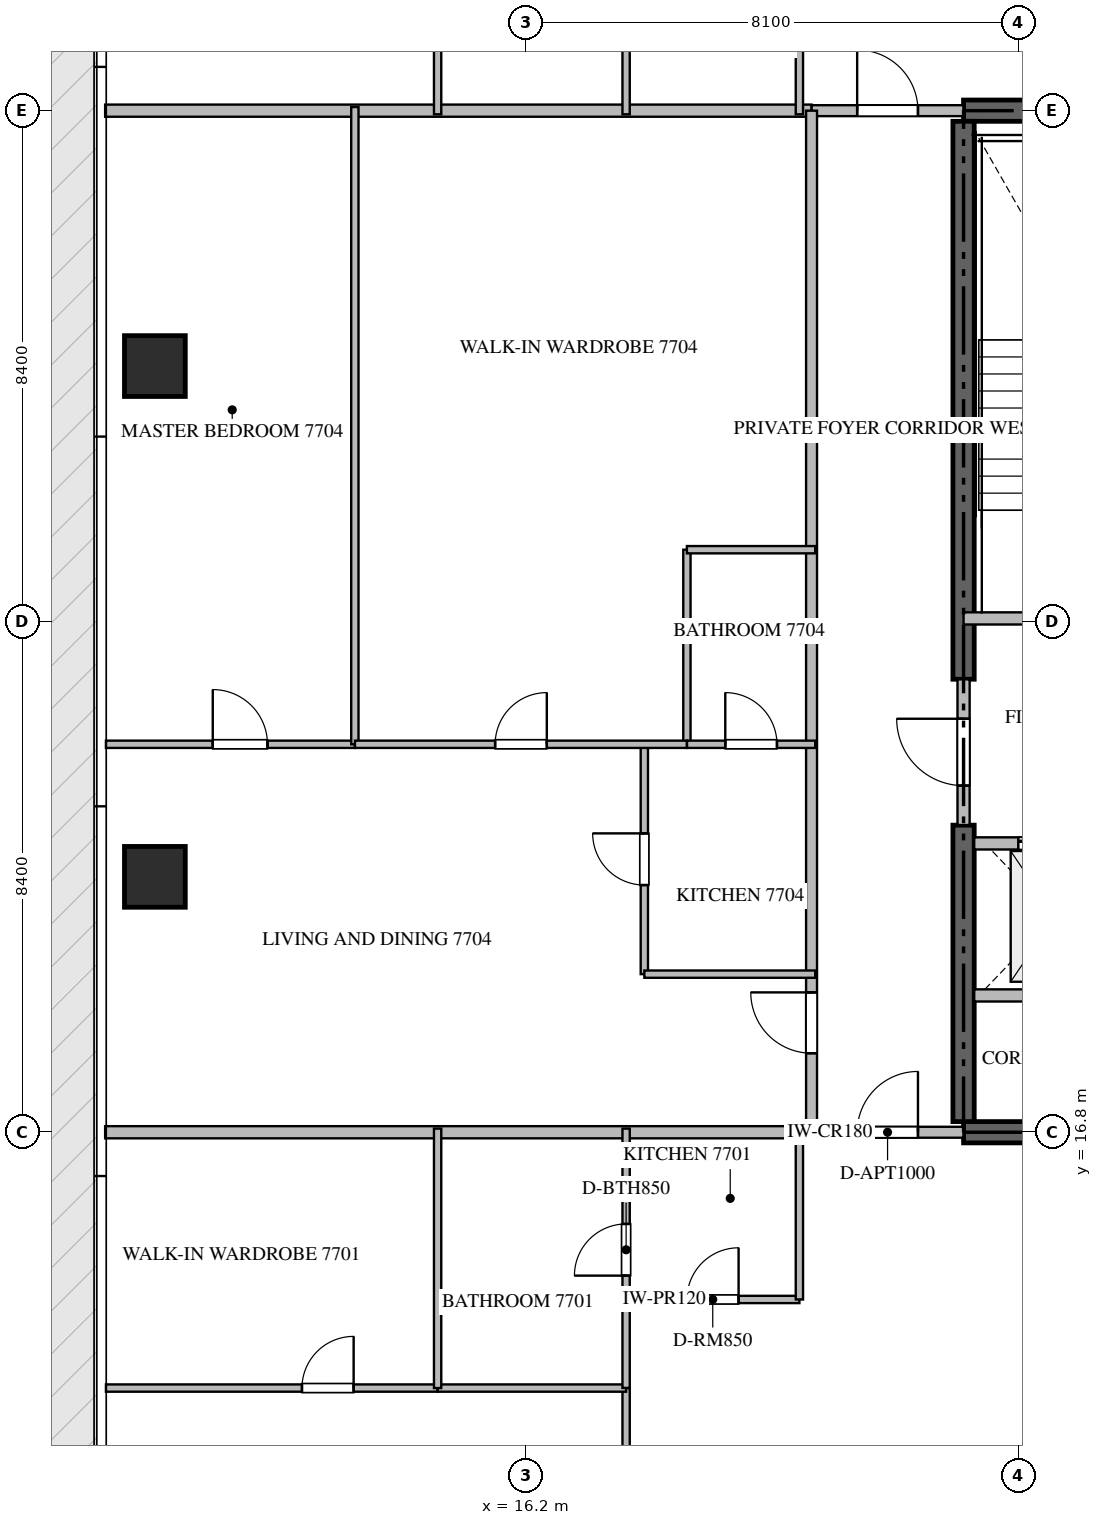
"""IFC4 building model, lengths in metres.
Left out: names, types, materials, properties, quantities, classifications, styles, units other than length and angle.
Written with IfcOpenShell. Run it as: python <this file> out.ifc"""

import sys

from ifc_helpers import new_model, si_unit, direction, frame, frame_2d, origin, origin_2d, place, context, subcontext, project, spatial, rectangle, extrude, source, transform, mapped, element, fill, save


model = new_model("IFC4")
c1 = context("Model", 3, precision=1e-05, world=origin(), true_north=direction((0.0, 1.0)))
c2 = subcontext(c1, "Body", "Model", "MODEL_VIEW")
j1 = project(units=[si_unit("LENGTHUNIT", "METRE"), si_unit("PLANEANGLEUNIT", "RADIAN")], contexts=[c1])
p1 = place(None, origin())
s1 = spatial("IfcSite", under=j1, at=p1, CompositionType="ELEMENT")
p2 = place(p1, origin())
s2 = spatial("IfcBuilding", under=s1, at=p2, CompositionType="ELEMENT")
p3 = place(p2, frame((0.0, 0.0, 309.65)))
s3 = spatial("IfcBuildingStorey", under=s2, at=p3, CompositionType="ELEMENT", Elevation=309.65)
for number, where, z_axis, x_axis in (
    (1, (23.4, 16.8, -0.26), (0.0, 0.0, 1.0), (1.0, 0.0, 0.0)),
    (2, (41.4, 33.6, -0.26), (0.0, 0.0, 1.0), (-1.0, 0.0, 0.0)),
):
    element("IfcWall", number, at=place(p3, frame(where, z_axis=z_axis, x_axis=x_axis)), inside=s3, PredefinedType="SHEAR", context=c2, shape_type="SweptSolid", body=[
        extrude(rectangle(XDim=18.0, YDim=0.35, at=frame_2d((9.0, 0.0))), origin(), (0.0, 0.0, 1.0), 4.048),
    ])
p4 = place(p3, frame((23.4, 16.975, -0.26), z_axis=(0.0, 0.0, 1.0), x_axis=(0.0, 1.0, 0.0)))
e3 = element("IfcWall", 3, at=p4, inside=s3, PredefinedType="SHEAR", context=c2, shape_type="SweptSolid", body=[
    extrude(rectangle(XDim=4.875, YDim=0.35, at=frame_2d((2.438, 0.0))), origin(), (0.0, 0.0, 1.0), 4.048),
])
p5 = place(p3, frame((23.4, 24.25, -0.26), z_axis=(0.0, 0.0, 1.0), x_axis=(0.0, 1.0, 0.0)))
e4 = element("IfcWall", 4, at=p5, inside=s3, PredefinedType="SHEAR", context=c2, shape_type="SweptSolid", body=[
    extrude(rectangle(XDim=9.175, YDim=0.35, at=frame_2d((4.587, 0.0))), origin(), (0.0, 0.0, 1.0), 4.048),
])
m1 = source(origin(), c2, "Body", "SweptSolid", [
    extrude(rectangle(XDim=1.0, YDim=1.0, at=origin_2d()), origin(), (0.0, 0.0, 1.0), 4.05),
])
for number, where, z_axis, x_axis in (
    (5, (10.1, 21.0, -0.26), (0.0, 0.0, 1.0), (1.0, 0.0, 0.0)),
    (6, (10.1, 29.4, -0.26), (0.0, 0.0, 1.0), (1.0, 0.0, 0.0)),
):
    element("IfcColumn", number, at=place(p3, frame(where, z_axis=z_axis, x_axis=x_axis)), inside=s3, PredefinedType="COLUMN", context=c2, shape_type="MappedRepresentation", body=[
        mapped(m1, transform((0.0, 0.0, 0.0), scale=1.0)),
    ])
p6 = place(p3, frame((23.4, 25.25, 0.0), z_axis=(0.0, 0.0, 1.0), x_axis=(1.0, 0.0, 0.0)))
e7 = element("IfcWall", 7, at=p6, inside=s3, PredefinedType="STANDARD", context=c2, shape_type="SweptSolid", body=[
    extrude(rectangle(XDim=4.45, YDim=0.2, at=frame_2d((2.225, 0.0))), origin(), (0.0, 0.0, 1.0), 3.79),
])
p7 = place(p6, frame((1.65, 0.0, 0.0)))
e8 = element("IfcOpeningElement", 8, at=p7, cuts=e7, PredefinedType="OPENING", context=c2, shape_type="SweptSolid", body=[
    extrude(rectangle(XDim=1.1, YDim=2.15, at=frame_2d((0.55, 1.075))), frame((0.0, 0.11, 0.0), z_axis=(0.0, -1.0, 0.0), x_axis=(1.0, 0.0, 0.0)), (0.0, 0.0, 1.0), 0.22),
])
p8 = place(p3, frame((23.575, 21.55, 0.0), z_axis=(0.0, 0.0, 1.0), x_axis=(1.0, 0.0, 0.0)))
e9 = element("IfcWall", 9, at=p8, inside=s3, PredefinedType="STANDARD", context=c2, shape_type="SweptSolid", body=[
    extrude(rectangle(XDim=2.475, YDim=0.2, at=frame_2d((1.238, 0.0))), origin(), (0.0, 0.0, 1.0), 3.79),
])
p9 = place(p8, frame((0.725, 0.0, 0.0)))
e10 = element("IfcOpeningElement", 10, at=p9, cuts=e9, PredefinedType="OPENING", context=c2, shape_type="SweptSolid", body=[
    extrude(rectangle(XDim=1.2, YDim=2.2, at=frame_2d((0.6, 1.1))), frame((0.0, 0.11, 0.0), z_axis=(0.0, -1.0, 0.0), x_axis=(1.0, 0.0, 0.0)), (0.0, 0.0, 1.0), 0.22),
])
p10 = place(p3, frame((23.575, 19.05, 0.0), z_axis=(0.0, 0.0, 1.0), x_axis=(1.0, 0.0, 0.0)))
e11 = element("IfcWall", 11, at=p10, inside=s3, PredefinedType="STANDARD", context=c2, shape_type="SweptSolid", body=[
    extrude(rectangle(XDim=2.475, YDim=0.2, at=frame_2d((1.238, 0.0))), origin(), (0.0, 0.0, 1.0), 3.79),
])
p11 = place(p3, frame((23.4, 21.852, 0.0), z_axis=(0.0, 0.0, 1.0), x_axis=(0.0, 1.0, 0.0)))
e12 = element("IfcWall", 12, at=p11, inside=s3, PredefinedType="STANDARD", context=c2, shape_type="SweptSolid", body=[
    extrude(rectangle(XDim=2.396, YDim=0.2, at=frame_2d((1.198, 0.0))), origin(), (0.0, 0.0, 1.0), 3.79),
])
p12 = place(p11, frame((0.648, 0.0, 0.0)))
e13 = element("IfcOpeningElement", 13, at=p12, cuts=e12, PredefinedType="OPENING", context=c2, shape_type="SweptSolid", body=[
    extrude(rectangle(XDim=1.1, YDim=2.15, at=frame_2d((0.55, 1.075))), frame((0.0, 0.11, 0.0), z_axis=(0.0, -1.0, 0.0), x_axis=(1.0, 0.0, 0.0)), (0.0, 0.0, 1.0), 0.22),
])
for number, where, z_axis, x_axis in (
    (14, (9.282, 16.8, 0.0), (0.0, 0.0, 1.0), (1.0, 0.0, 0.0)),
    (15, (9.282, 33.6, 0.0), (0.0, 0.0, 1.0), (1.0, 0.0, 0.0)),
):
    element("IfcWall", number, at=place(p3, frame(where, z_axis=z_axis, x_axis=x_axis)), inside=s3, PredefinedType="PARTITIONING", context=c2, shape_type="SweptSolid", body=[
        extrude(rectangle(XDim=11.618, YDim=0.2, at=frame_2d((5.809, 0.0))), origin(), (0.0, 0.0, 1.0), 3.79),
    ])
p13 = place(p3, frame((20.902, 16.8, 0.0), z_axis=(0.0, 0.0, 1.0), x_axis=(1.0, 0.0, 0.0)))
e16 = element("IfcWall", 16, at=p13, inside=s3, PredefinedType="PARTITIONING", context=c2, shape_type="SweptSolid", body=[
    extrude(rectangle(XDim=2.496, YDim=0.18, at=frame_2d((1.248, 0.0))), origin(), (0.0, 0.0, 1.0), 3.79),
])
p14 = place(p13, frame((0.748, 0.0, 0.0)))
e17 = element("IfcOpeningElement", 17, at=p14, cuts=e16, PredefinedType="OPENING", context=c2, shape_type="SweptSolid", body=[
    extrude(rectangle(XDim=1.0, YDim=2.15, at=frame_2d((0.5, 1.075))), frame((0.0, 0.1, 0.0), z_axis=(0.0, -1.0, 0.0), x_axis=(1.0, 0.0, 0.0)), (0.0, 0.0, 1.0), 0.2),
])
p15 = place(p3, frame((20.902, 33.6, 0.0), z_axis=(0.0, 0.0, 1.0), x_axis=(1.0, 0.0, 0.0)))
e18 = element("IfcWall", 18, at=p15, inside=s3, PredefinedType="PARTITIONING", context=c2, shape_type="SweptSolid", body=[
    extrude(rectangle(XDim=2.496, YDim=0.18, at=frame_2d((1.248, 0.0))), origin(), (0.0, 0.0, 1.0), 3.79),
])
p16 = place(p15, frame((0.748, 0.0, 0.0)))
e19 = element("IfcOpeningElement", 19, at=p16, cuts=e18, PredefinedType="OPENING", context=c2, shape_type="SweptSolid", body=[
    extrude(rectangle(XDim=1.0, YDim=2.15, at=frame_2d((0.5, 1.075))), frame((0.0, 0.1, 0.0), z_axis=(0.0, -1.0, 0.0), x_axis=(1.0, 0.0, 0.0)), (0.0, 0.0, 1.0), 0.2),
])
p17 = place(p3, frame((20.9, 16.8, 0.0), z_axis=(0.0, 0.0, 1.0), x_axis=(0.0, 1.0, 0.0)))
e20 = element("IfcWall", 20, at=p17, inside=s3, PredefinedType="PARTITIONING", context=c2, shape_type="SweptSolid", body=[
    extrude(rectangle(XDim=16.8, YDim=0.18, at=frame_2d((8.4, 0.0))), origin(), (0.0, 0.0, 1.0), 3.79),
])
p18 = place(p17, frame((1.3, 0.0, 0.0)))
e21 = element("IfcOpeningElement", 21, at=p18, cuts=e20, PredefinedType="OPENING", context=c2, shape_type="SweptSolid", body=[
    extrude(rectangle(XDim=1.0, YDim=2.15, at=frame_2d((0.5, 1.075))), frame((0.0, 0.1, 0.0), z_axis=(0.0, -1.0, 0.0), x_axis=(1.0, 0.0, 0.0)), (0.0, 0.0, 1.0), 0.2),
])
p19 = place(p3, frame((17.85, 14.05, 0.0), z_axis=(0.0, 0.0, 1.0), x_axis=(1.0, 0.0, 0.0)))
e22 = element("IfcWall", 22, at=p19, inside=s3, PredefinedType="PARTITIONING", context=c2, shape_type="SweptSolid", body=[
    extrude(rectangle(XDim=2.85, YDim=0.12, at=frame_2d((1.425, 0.0))), origin(), (0.0, 0.0, 1.0), 3.492),
])
p20 = place(p19, frame((1.0, 0.0, 0.0)))
e23 = element("IfcOpeningElement", 23, at=p20, cuts=e22, PredefinedType="OPENING", context=c2, shape_type="SweptSolid", body=[
    extrude(rectangle(XDim=0.85, YDim=2.1, at=frame_2d((0.425, 1.05))), frame((0.0, 0.07, 0.0), z_axis=(0.0, -1.0, 0.0), x_axis=(1.0, 0.0, 0.0)), (0.0, 0.0, 1.0), 0.14),
])
p21 = place(p3, frame((20.7, 14.05, 0.0), z_axis=(0.0, 0.0, 1.0), x_axis=(0.0, 1.0, 0.0)))
e24 = element("IfcWall", 24, at=p21, inside=s3, PredefinedType="PARTITIONING", context=c2, shape_type="SweptSolid", body=[
    extrude(rectangle(XDim=2.81, YDim=0.12, at=frame_2d((1.405, 0.0))), origin(), (0.0, 0.0, 1.0), 3.79),
])
p22 = place(p3, frame((17.85, 2.495, 0.0), z_axis=(0.0, 0.0, 1.0), x_axis=(0.0, 1.0, 0.0)))
e25 = element("IfcWall", 25, at=p22, inside=s3, PredefinedType="PARTITIONING", context=c2, shape_type="SweptSolid", body=[
    extrude(rectangle(XDim=10.098, YDim=0.12, at=frame_2d((5.049, 0.0))), origin(), (0.0, 0.0, 1.0), 3.292),
])
p23 = place(p22, frame((5.059, 0.0, 0.0)))
e26 = element("IfcOpeningElement", 26, at=p23, cuts=e25, PredefinedType="OPENING", context=c2, shape_type="SweptSolid", body=[
    extrude(rectangle(XDim=0.9, YDim=2.1, at=frame_2d((0.45, 1.05))), frame((0.0, 0.07, 0.0), z_axis=(0.0, -1.0, 0.0), x_axis=(1.0, 0.0, 0.0)), (0.0, 0.0, 1.0), 0.14),
])
p24 = place(p3, frame((9.295, 12.593, 0.0), z_axis=(0.0, 0.0, 1.0), x_axis=(1.0, 0.0, 0.0)))
e27 = element("IfcWall", 27, at=p24, inside=s3, PredefinedType="PARTITIONING", context=c2, shape_type="SweptSolid", body=[
    extrude(rectangle(XDim=5.455, YDim=0.12, at=frame_2d((2.728, 0.0))), origin(), (0.0, 0.0, 1.0), 3.79),
])
p25 = place(p24, frame((3.224, 0.0, 0.0)))
e28 = element("IfcOpeningElement", 28, at=p25, cuts=e27, PredefinedType="OPENING", context=c2, shape_type="SweptSolid", body=[
    extrude(rectangle(XDim=0.85, YDim=2.1, at=frame_2d((0.425, 1.05))), frame((0.0, 0.07, 0.0), z_axis=(0.0, -1.0, 0.0), x_axis=(1.0, 0.0, 0.0)), (0.0, 0.0, 1.0), 0.14),
])
p26 = place(p3, frame((14.752, 12.593, 0.0), z_axis=(0.0, 0.0, 1.0), x_axis=(1.0, 0.0, 0.0)))
e29 = element("IfcWall", 29, at=p26, inside=s3, PredefinedType="PARTITIONING", context=c2, shape_type="SweptSolid", body=[
    extrude(rectangle(XDim=3.098, YDim=0.12, at=frame_2d((1.549, 0.0))), origin(), (0.0, 0.0, 1.0), 3.79),
])
p27 = place(p3, frame((14.75, 12.593, 0.0), z_axis=(0.0, 0.0, 1.0), x_axis=(0.0, 1.0, 0.0)))
e30 = element("IfcWall", 30, at=p27, inside=s3, PredefinedType="PARTITIONING", context=c2, shape_type="SweptSolid", body=[
    extrude(rectangle(XDim=4.267, YDim=0.12, at=frame_2d((2.134, 0.0))), origin(), (0.0, 0.0, 1.0), 3.79),
])
p28 = place(p3, frame((17.85, 12.595, 0.0), z_axis=(0.0, 0.0, 1.0), x_axis=(0.0, 1.0, 0.0)))
e31 = element("IfcWall", 31, at=p28, inside=s3, PredefinedType="PARTITIONING", context=c2, shape_type="SweptSolid", body=[
    extrude(rectangle(XDim=4.265, YDim=0.12, at=frame_2d((2.133, 0.0))), origin(), (0.0, 0.0, 1.0), 3.372),
])
p29 = place(p28, frame((1.847, 0.0, 0.0)))
e32 = element("IfcOpeningElement", 32, at=p29, cuts=e31, PredefinedType="OPENING", context=c2, shape_type="SweptSolid", body=[
    extrude(rectangle(XDim=0.85, YDim=2.1, at=frame_2d((0.425, 1.05))), frame((0.0, 0.07, 0.0), z_axis=(0.0, -1.0, 0.0), x_axis=(1.0, 0.0, 0.0)), (0.0, 0.0, 1.0), 0.14),
])
p30 = place(p3, frame((20.7, 36.35, 0.0), z_axis=(0.0, 0.0, 1.0), x_axis=(0.0, -1.0, 0.0)))
e33 = element("IfcWall", 33, at=p30, inside=s3, PredefinedType="PARTITIONING", context=c2, shape_type="SweptSolid", body=[
    extrude(rectangle(XDim=2.81, YDim=0.12, at=frame_2d((1.405, 0.0))), origin(), (0.0, 0.0, 1.0), 3.79),
])
p31 = place(p3, frame((14.75, 37.807, 0.0), z_axis=(0.0, 0.0, 1.0), x_axis=(0.0, -1.0, 0.0)))
e34 = element("IfcWall", 34, at=p31, inside=s3, PredefinedType="PARTITIONING", context=c2, shape_type="SweptSolid", body=[
    extrude(rectangle(XDim=4.267, YDim=0.12, at=frame_2d((2.133, 0.0))), origin(), (0.0, 0.0, 1.0), 3.79),
])
p32 = place(p3, frame((17.85, 37.805, 0.0), z_axis=(0.0, 0.0, 1.0), x_axis=(0.0, -1.0, 0.0)))
e35 = element("IfcWall", 35, at=p32, inside=s3, PredefinedType="PARTITIONING", context=c2, shape_type="SweptSolid", body=[
    extrude(rectangle(XDim=4.265, YDim=0.12, at=frame_2d((2.132, 0.0))), origin(), (0.0, 0.0, 1.0), 3.372),
])
p33 = place(p32, frame((1.848, 0.0, 0.0)))
e36 = element("IfcOpeningElement", 36, at=p33, cuts=e35, PredefinedType="OPENING", context=c2, shape_type="SweptSolid", body=[
    extrude(rectangle(XDim=0.85, YDim=2.1, at=frame_2d((0.425, 1.05))), frame((0.0, 0.07, 0.0), z_axis=(0.0, -1.0, 0.0), x_axis=(1.0, 0.0, 0.0)), (0.0, 0.0, 1.0), 0.14),
])
p34 = place(p3, frame((18.15, 19.4, 0.0), z_axis=(0.0, 0.0, 1.0), x_axis=(0.0, 1.0, 0.0)))
e37 = element("IfcWall", 37, at=p34, inside=s3, PredefinedType="PARTITIONING", context=c2, shape_type="SweptSolid", body=[
    extrude(rectangle(XDim=3.78, YDim=0.12, at=frame_2d((1.89, 0.0))), origin(), (0.0, 0.0, 1.0), 3.79),
])
p35 = place(p34, frame((1.465, 0.0, 0.0)))
e38 = element("IfcOpeningElement", 38, at=p35, cuts=e37, PredefinedType="OPENING", context=c2, shape_type="SweptSolid", body=[
    extrude(rectangle(XDim=0.85, YDim=2.1, at=frame_2d((0.425, 1.05))), frame((0.0, 0.07, 0.0), z_axis=(0.0, -1.0, 0.0), x_axis=(1.0, 0.0, 0.0)), (0.0, 0.0, 1.0), 0.14),
])
p36 = place(p3, frame((18.15, 19.4, 0.0), z_axis=(0.0, 0.0, 1.0), x_axis=(1.0, 0.0, 0.0)))
e39 = element("IfcWall", 39, at=p36, inside=s3, PredefinedType="PARTITIONING", context=c2, shape_type="SweptSolid", body=[
    extrude(rectangle(XDim=2.81, YDim=0.12, at=frame_2d((1.405, 0.0))), origin(), (0.0, 0.0, 1.0), 3.79),
])
p37 = place(p3, frame((9.295, 23.18, 0.0), z_axis=(0.0, 0.0, 1.0), x_axis=(1.0, 0.0, 0.0)))
e40 = element("IfcWall", 40, at=p37, inside=s3, PredefinedType="PARTITIONING", context=c2, shape_type="SweptSolid", body=[
    extrude(rectangle(XDim=4.094, YDim=0.12, at=frame_2d((2.047, 0.0))), origin(), (0.0, 0.0, 1.0), 3.79),
])
p38 = place(p37, frame((1.757, 0.0, 0.0)))
e41 = element("IfcOpeningElement", 41, at=p38, cuts=e40, PredefinedType="OPENING", context=c2, shape_type="SweptSolid", body=[
    extrude(rectangle(XDim=0.9, YDim=2.1, at=frame_2d((0.45, 1.05))), frame((0.0, 0.07, 0.0), z_axis=(0.0, -1.0, 0.0), x_axis=(1.0, 0.0, 0.0)), (0.0, 0.0, 1.0), 0.14),
])
p39 = place(p3, frame((13.389, 23.18, 0.0), z_axis=(0.0, 0.0, 1.0), x_axis=(0.0, 1.0, 0.0)))
e42 = element("IfcWall", 42, at=p39, inside=s3, PredefinedType="PARTITIONING", context=c2, shape_type="SweptSolid", body=[
    extrude(rectangle(XDim=10.48, YDim=0.12, at=frame_2d((5.24, 0.0))), origin(), (0.0, 0.0, 1.0), 3.79),
])
p40 = place(p3, frame((18.85, 23.18, 0.0), z_axis=(0.0, 0.0, 1.0), x_axis=(0.0, 1.0, 0.0)))
e43 = element("IfcWall", 43, at=p40, inside=s3, PredefinedType="PARTITIONING", context=c2, shape_type="SweptSolid", body=[
    extrude(rectangle(XDim=3.2, YDim=0.12, at=frame_2d((1.6, 0.0))), origin(), (0.0, 0.0, 1.0), 3.79),
])
p41 = place(p3, frame((18.85, 26.38, 0.0), z_axis=(0.0, 0.0, 1.0), x_axis=(1.0, 0.0, 0.0)))
e44 = element("IfcWall", 44, at=p41, inside=s3, PredefinedType="PARTITIONING", context=c2, shape_type="SweptSolid", body=[
    extrude(rectangle(XDim=2.11, YDim=0.12, at=frame_2d((1.055, 0.0))), origin(), (0.0, 0.0, 1.0), 3.79),
])
p42 = place(p3, frame((13.391, 23.18, 0.0), z_axis=(0.0, 0.0, 1.0), x_axis=(1.0, 0.0, 0.0)))
e45 = element("IfcWall", 45, at=p42, inside=s3, PredefinedType="PARTITIONING", context=c2, shape_type="SweptSolid", body=[
    extrude(rectangle(XDim=5.459, YDim=0.12, at=frame_2d((2.729, 0.0))), origin(), (0.0, 0.0, 1.0), 3.79),
])
p43 = place(p42, frame((2.305, 0.0, 0.0)))
e46 = element("IfcOpeningElement", 46, at=p43, cuts=e45, PredefinedType="OPENING", context=c2, shape_type="SweptSolid", body=[
    extrude(rectangle(XDim=0.85, YDim=2.1, at=frame_2d((0.425, 1.05))), frame((0.0, 0.07, 0.0), z_axis=(0.0, -1.0, 0.0), x_axis=(1.0, 0.0, 0.0)), (0.0, 0.0, 1.0), 0.14),
])
p44 = place(p3, frame((18.852, 23.18, 0.0), z_axis=(0.0, 0.0, 1.0), x_axis=(1.0, 0.0, 0.0)))
e47 = element("IfcWall", 47, at=p44, inside=s3, PredefinedType="PARTITIONING", context=c2, shape_type="SweptSolid", body=[
    extrude(rectangle(XDim=2.108, YDim=0.12, at=frame_2d((1.054, 0.0))), origin(), (0.0, 0.0, 1.0), 3.79),
])
p45 = place(p44, frame((0.629, 0.0, 0.0)))
e48 = element("IfcOpeningElement", 48, at=p45, cuts=e47, PredefinedType="OPENING", context=c2, shape_type="SweptSolid", body=[
    extrude(rectangle(XDim=0.85, YDim=2.1, at=frame_2d((0.425, 1.05))), frame((0.0, 0.07, 0.0), z_axis=(0.0, -1.0, 0.0), x_axis=(1.0, 0.0, 0.0)), (0.0, 0.0, 1.0), 0.14),
])
m2 = source(origin(), c2, "Body", "SweptSolid", [
    extrude(rectangle(XDim=1.2, YDim=2.2, at=frame_2d((0.6, 1.1))), frame((0.0, 0.025, 0.0), z_axis=(0.0, -1.0, 0.0), x_axis=(1.0, 0.0, 0.0)), (0.0, 0.0, 1.0), 0.05),
])
p46 = place(p9, origin())
e49 = element("IfcDoor", 49, at=p46, inside=s3, OperationType="DOUBLE_DOOR_SLIDING", PredefinedType="DOOR", context=c2, shape_type="MappedRepresentation", body=[
    mapped(m2, transform((0.0, 0.0, 0.0), scale=1.0)),
])
fill(e10, e49)
m3 = source(origin(), c2, "Body", "SweptSolid", [
    extrude(rectangle(XDim=1.1, YDim=2.15, at=frame_2d((0.55, 1.075))), frame((0.0, 0.025, 0.0), z_axis=(0.0, -1.0, 0.0), x_axis=(1.0, 0.0, 0.0)), (0.0, 0.0, 1.0), 0.05),
])
p47 = place(p12, origin())
e50 = element("IfcDoor", 50, at=p47, inside=s3, OperationType="SINGLE_SWING_RIGHT", PredefinedType="DOOR", context=c2, shape_type="MappedRepresentation", body=[
    mapped(m3, transform((0.0, 0.0, 0.0), scale=1.0)),
])
fill(e13, e50)
m4 = source(origin(), c2, "Body", "SweptSolid", [
    extrude(rectangle(XDim=1.0, YDim=2.15, at=frame_2d((0.5, 1.075))), frame((0.0, 0.025, 0.0), z_axis=(0.0, -1.0, 0.0), x_axis=(1.0, 0.0, 0.0)), (0.0, 0.0, 1.0), 0.05),
])
p48 = place(p14, origin())
e51 = element("IfcDoor", 51, at=p48, inside=s3, OperationType="SINGLE_SWING_RIGHT", PredefinedType="DOOR", context=c2, shape_type="MappedRepresentation", body=[
    mapped(m4, transform((0.0, 0.0, 0.0), scale=1.0)),
])
fill(e17, e51)
p49 = place(p16, origin())
e52 = element("IfcDoor", 52, at=p49, inside=s3, OperationType="SINGLE_SWING_LEFT", PredefinedType="DOOR", context=c2, shape_type="MappedRepresentation", body=[
    mapped(m4, transform((0.0, 0.0, 0.0), scale=1.0)),
])
fill(e19, e52)
p50 = place(p18, origin())
e53 = element("IfcDoor", 53, at=p50, inside=s3, OperationType="SINGLE_SWING_RIGHT", PredefinedType="DOOR", context=c2, shape_type="MappedRepresentation", body=[
    mapped(m4, transform((0.0, 0.0, 0.0), scale=1.0)),
])
fill(e21, e53)
m5 = source(origin(), c2, "Body", "SweptSolid", [
    extrude(rectangle(XDim=0.85, YDim=2.1, at=frame_2d((0.425, 1.05))), frame((0.0, 0.025, 0.0), z_axis=(0.0, -1.0, 0.0), x_axis=(1.0, 0.0, 0.0)), (0.0, 0.0, 1.0), 0.05),
])
p51 = place(p20, origin())
e54 = element("IfcDoor", 54, at=p51, inside=s3, OperationType="SINGLE_SWING_RIGHT", PredefinedType="DOOR", context=c2, shape_type="MappedRepresentation", body=[
    mapped(m5, transform((0.0, 0.0, 0.0), scale=1.0)),
])
fill(e23, e54)
p52 = place(p25, origin())
e55 = element("IfcDoor", 55, at=p52, inside=s3, OperationType="SINGLE_SWING_RIGHT", PredefinedType="DOOR", context=c2, shape_type="MappedRepresentation", body=[
    mapped(m5, transform((0.0, 0.0, 0.0), scale=1.0)),
])
fill(e28, e55)
p53 = place(p29, origin())
e56 = element("IfcDoor", 56, at=p53, inside=s3, OperationType="SINGLE_SWING_LEFT", PredefinedType="DOOR", context=c2, shape_type="MappedRepresentation", body=[
    mapped(m5, transform((0.0, 0.0, 0.0), scale=1.0)),
])
fill(e32, e56)
p54 = place(p35, origin())
e57 = element("IfcDoor", 57, at=p54, inside=s3, OperationType="SINGLE_SWING_RIGHT", PredefinedType="DOOR", context=c2, shape_type="MappedRepresentation", body=[
    mapped(m5, transform((0.0, 0.0, 0.0), scale=1.0)),
])
fill(e38, e57)
m6 = source(origin(), c2, "Body", "SweptSolid", [
    extrude(rectangle(XDim=0.9, YDim=2.1, at=frame_2d((0.45, 1.05))), frame((0.0, 0.025, 0.0), z_axis=(0.0, -1.0, 0.0), x_axis=(1.0, 0.0, 0.0)), (0.0, 0.0, 1.0), 0.05),
])
p55 = place(p38, origin())
e58 = element("IfcDoor", 58, at=p55, inside=s3, OperationType="SINGLE_SWING_LEFT", PredefinedType="DOOR", context=c2, shape_type="MappedRepresentation", body=[
    mapped(m6, transform((0.0, 0.0, 0.0), scale=1.0)),
])
fill(e41, e58)
p56 = place(p43, origin())
e59 = element("IfcDoor", 59, at=p56, inside=s3, OperationType="SINGLE_SWING_RIGHT", PredefinedType="DOOR", context=c2, shape_type="MappedRepresentation", body=[
    mapped(m5, transform((0.0, 0.0, 0.0), scale=1.0)),
])
fill(e46, e59)
p57 = place(p45, origin())
e60 = element("IfcDoor", 60, at=p57, inside=s3, OperationType="SINGLE_SWING_LEFT", PredefinedType="DOOR", context=c2, shape_type="MappedRepresentation", body=[
    mapped(m5, transform((0.0, 0.0, 0.0), scale=1.0)),
])
fill(e48, e60)
save(model, sys.argv[1])
